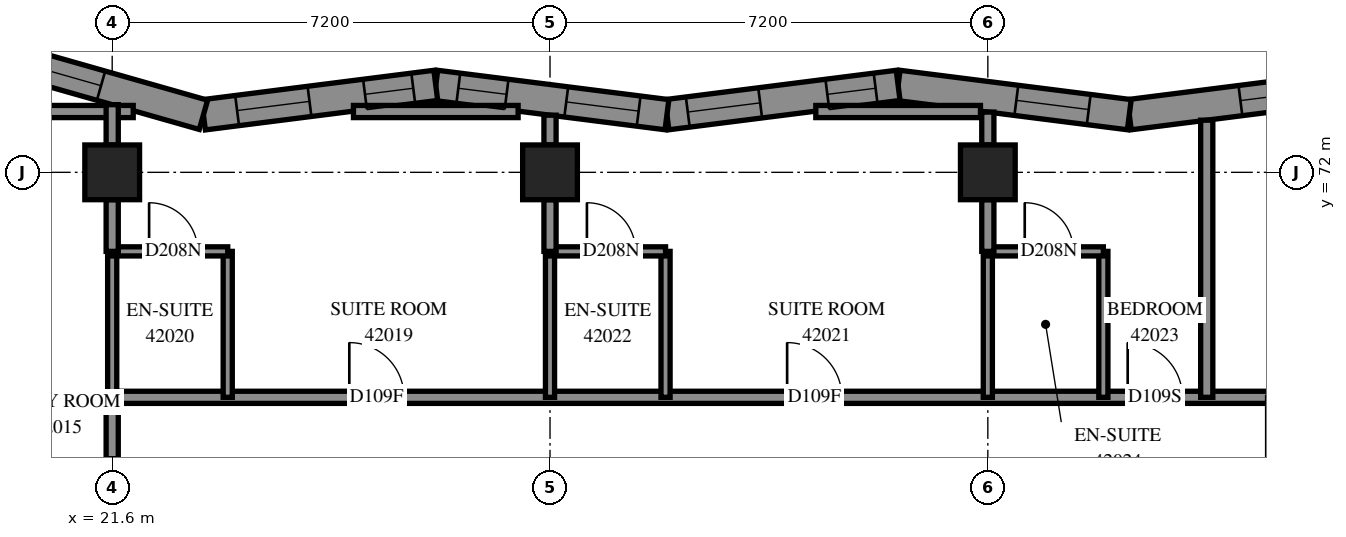
"""IFC4 building model, lengths in metres.
Left out: names, types, materials, properties, quantities, classifications, styles, units other than length and angle.
Written with IfcOpenShell. Run it as: python <this file> out.ifc"""

import sys

from ifc_helpers import new_model, si_unit, direction, frame, frame_2d, origin, origin_2d, place, context, subcontext, project, spatial, polyline, rectangle, outline, extrude, element, fill, save


model = new_model("IFC4")
c1 = context("Model", 3, precision=1e-05, world=origin(), true_north=direction((0.0, 1.0)))
c2 = subcontext(c1, "Body", "Model", "MODEL_VIEW")
j1 = project(units=[si_unit("LENGTHUNIT", "METRE"), si_unit("PLANEANGLEUNIT", "RADIAN")], contexts=[c1])
p1 = place(None, origin())
s1 = spatial("IfcSite", under=j1, at=p1, CompositionType="ELEMENT")
p2 = place(p1, origin())
s2 = spatial("IfcBuilding", under=s1, at=p2, CompositionType="ELEMENT")
p3 = place(p2, frame((0.0, 0.0, 155.8)))
s3 = spatial("IfcBuildingStorey", under=s2, at=p3, CompositionType="ELEMENT", Elevation=155.8)
for number, where, z_axis, x_axis in (
    (1, (21.6, 72.0, 0.0), (0.0, 0.0, 1.0), (1.0, 0.0, 0.0)),
    (2, (28.8, 72.0, 0.0), (0.0, 0.0, 1.0), (1.0, 0.0, 0.0)),
    (3, (36.0, 72.0, 0.0), (0.0, 0.0, 1.0), (1.0, 0.0, 0.0)),
):
    element("IfcColumn", number, at=place(p3, frame(where, z_axis=z_axis, x_axis=x_axis)), inside=s3, PredefinedType="COLUMN", context=c2, shape_type="SweptSolid", body=[
        extrude(rectangle(XDim=0.9, YDim=0.9, at=origin_2d()), origin(), (0.0, 0.0, 1.0), 3.1),
    ])
p4 = place(p3, frame((42.128, 73.43, 0.0), z_axis=(0.0, 0.0, 1.0), x_axis=(-0.9920583495, -0.1257785003, 0.0)))
e4 = element("IfcWall", 4, at=p4, inside=s3, PredefinedType="SOLIDWALL", context=c2, shape_type="SweptSolid", body=[
    extrude(outline(polyline([(-0.032, -0.25), (3.8, -0.25), (3.864, 0.25), (0.032, 0.25), (-0.032, -0.25)])), origin(), (0.0, 0.0, 1.0), 3.1),
])
p5 = place(p4, frame((0.79, 0.0, 0.45)))
e5 = element("IfcOpeningElement", 5, at=p5, cuts=e4, PredefinedType="OPENING", context=c2, shape_type="SweptSolid", body=[
    extrude(rectangle(XDim=1.2, YDim=2.5, at=frame_2d((0.6, 1.25))), frame((0.0, 0.26, 0.0), z_axis=(0.0, -1.0, 0.0), x_axis=(1.0, 0.0, 0.0)), (0.0, 0.0, 1.0), 0.52),
])
p6 = place(p3, frame((38.327, 72.948, 0.0), z_axis=(0.0, 0.0, 1.0), x_axis=(-0.9920583495, 0.1257785003, 0.0)))
e6 = element("IfcWall", 6, at=p6, inside=s3, PredefinedType="SOLIDWALL", context=c2, shape_type="SweptSolid", body=[
    extrude(outline(polyline([(0.032, -0.25), (3.864, -0.25), (3.8, 0.25), (-0.032, 0.25), (0.032, -0.25)])), origin(), (0.0, 0.0, 1.0), 3.1),
])
p7 = place(p6, frame((0.673, 0.0, 0.45)))
e7 = element("IfcOpeningElement", 7, at=p7, cuts=e6, PredefinedType="OPENING", context=c2, shape_type="SweptSolid", body=[
    extrude(rectangle(XDim=1.2, YDim=2.5, at=frame_2d((0.6, 1.25))), frame((0.0, 0.26, 0.0), z_axis=(0.0, -1.0, 0.0), x_axis=(1.0, 0.0, 0.0)), (0.0, 0.0, 1.0), 0.52),
])
p8 = place(p3, frame((34.525, 73.43, 0.0), z_axis=(0.0, 0.0, 1.0), x_axis=(-0.9920583495, -0.1257785003, 0.0)))
e8 = element("IfcWall", 8, at=p8, inside=s3, PredefinedType="SOLIDWALL", context=c2, shape_type="SweptSolid", body=[
    extrude(outline(polyline([(-0.032, -0.25), (3.8, -0.25), (3.864, 0.25), (0.032, 0.25), (-0.032, -0.25)])), origin(), (0.0, 0.0, 1.0), 3.1),
])
p9 = place(p8, frame((2.287, 0.0, 0.45)))
e9 = element("IfcOpeningElement", 9, at=p9, cuts=e8, PredefinedType="OPENING", context=c2, shape_type="SweptSolid", body=[
    extrude(rectangle(XDim=1.2, YDim=2.5, at=frame_2d((0.6, 1.25))), frame((0.0, 0.26, 0.0), z_axis=(0.0, -1.0, 0.0), x_axis=(1.0, 0.0, 0.0)), (0.0, 0.0, 1.0), 0.52),
])
p10 = place(p8, frame((0.373, 0.0, 0.45)))
e10 = element("IfcOpeningElement", 10, at=p10, cuts=e8, PredefinedType="OPENING", context=c2, shape_type="SweptSolid", body=[
    extrude(rectangle(XDim=0.8, YDim=2.5, at=frame_2d((0.4, 1.25))), frame((0.0, 0.26, 0.0), z_axis=(0.0, -1.0, 0.0), x_axis=(1.0, 0.0, 0.0)), (0.0, 0.0, 1.0), 0.52),
])
p11 = place(p3, frame((30.723, 72.948, 0.0), z_axis=(0.0, 0.0, 1.0), x_axis=(-0.9920583495, 0.1257785003, 0.0)))
e11 = element("IfcWall", 11, at=p11, inside=s3, PredefinedType="SOLIDWALL", context=c2, shape_type="SweptSolid", body=[
    extrude(outline(polyline([(0.032, -0.25), (3.864, -0.25), (3.8, 0.25), (-0.032, 0.25), (0.032, -0.25)])), origin(), (0.0, 0.0, 1.0), 3.1),
])
p12 = place(p11, frame((0.469, 0.0, 0.45)))
e12 = element("IfcOpeningElement", 12, at=p12, cuts=e11, PredefinedType="OPENING", context=c2, shape_type="SweptSolid", body=[
    extrude(rectangle(XDim=1.2, YDim=2.5, at=frame_2d((0.6, 1.25))), frame((0.0, 0.26, 0.0), z_axis=(0.0, -1.0, 0.0), x_axis=(1.0, 0.0, 0.0)), (0.0, 0.0, 1.0), 0.52),
])
p13 = place(p11, frame((2.659, 0.0, 0.45)))
e13 = element("IfcOpeningElement", 13, at=p13, cuts=e11, PredefinedType="OPENING", context=c2, shape_type="SweptSolid", body=[
    extrude(rectangle(XDim=0.8, YDim=2.5, at=frame_2d((0.4, 1.25))), frame((0.0, 0.26, 0.0), z_axis=(0.0, -1.0, 0.0), x_axis=(1.0, 0.0, 0.0)), (0.0, 0.0, 1.0), 0.52),
])
p14 = place(p3, frame((26.921, 73.43, 0.0), z_axis=(0.0, 0.0, 1.0), x_axis=(-0.9920598708, -0.1257665013, 0.0)))
e14 = element("IfcWall", 14, at=p14, inside=s3, PredefinedType="SOLIDWALL", context=c2, shape_type="SweptSolid", body=[
    extrude(outline(polyline([(-0.032, -0.25), (3.8, -0.25), (3.903, 0.25), (0.032, 0.25), (-0.032, -0.25)])), origin(), (0.0, 0.0, 1.0), 3.1),
])
p15 = place(p14, frame((2.093, 0.0, 0.45)))
e15 = element("IfcOpeningElement", 15, at=p15, cuts=e14, PredefinedType="OPENING", context=c2, shape_type="SweptSolid", body=[
    extrude(rectangle(XDim=1.2, YDim=2.5, at=frame_2d((0.6, 1.25))), frame((0.0, 0.26, 0.0), z_axis=(0.0, -1.0, 0.0), x_axis=(1.0, 0.0, 0.0)), (0.0, 0.0, 1.0), 0.52),
])
p16 = place(p14, frame((0.373, 0.0, 0.45)))
e16 = element("IfcOpeningElement", 16, at=p16, cuts=e14, PredefinedType="OPENING", context=c2, shape_type="SweptSolid", body=[
    extrude(rectangle(XDim=0.8, YDim=2.5, at=frame_2d((0.4, 1.25))), frame((0.0, 0.26, 0.0), z_axis=(0.0, -1.0, 0.0), x_axis=(1.0, 0.0, 0.0)), (0.0, 0.0, 1.0), 0.52),
])
p17 = place(p3, frame((23.1, 72.946, 0.0), z_axis=(0.0, 0.0, 1.0), x_axis=(-0.9618080431, 0.2737248403, 0.0)))
e17 = element("IfcWall", 17, at=p17, inside=s3, PredefinedType="SOLIDWALL", context=c2, shape_type="SweptSolid", body=[
    extrude(outline(polyline([(0.051, -0.25), (4.004, -0.25), (3.342, 0.25), (-0.051, 0.25), (0.051, -0.25)])), origin(), (0.0, 0.0, 1.0), 3.1),
])
p18 = place(p17, frame((1.751, 0.0, 0.45)))
e18 = element("IfcOpeningElement", 18, at=p18, cuts=e17, PredefinedType="OPENING", context=c2, shape_type="SweptSolid", body=[
    extrude(rectangle(XDim=1.2, YDim=2.5, at=frame_2d((0.6, 1.25))), frame((0.0, 0.26, 0.0), z_axis=(0.0, -1.0, 0.0), x_axis=(1.0, 0.0, 0.0)), (0.0, 0.0, 1.0), 0.52),
])
p19 = place(p3, frame((21.6, 68.3, 0.0), z_axis=(0.0, 0.0, 1.0), x_axis=(1.0, 0.0, 0.0)))
e19 = element("IfcWall", 19, at=p19, inside=s3, PredefinedType="PARTITIONING", context=c2, shape_type="SweptSolid", body=[
    extrude(rectangle(XDim=19.1, YDim=0.2, at=frame_2d((9.55, 0.0))), origin(), (0.0, 0.0, 1.0), 3.1),
])
p20 = place(p19, frame((3.899, 0.0, 0.0)))
e20 = element("IfcOpeningElement", 20, at=p20, cuts=e19, PredefinedType="OPENING", context=c2, shape_type="SweptSolid", body=[
    extrude(rectangle(XDim=0.9, YDim=2.1, at=frame_2d((0.45, 1.05))), frame((0.0, 0.11, 0.0), z_axis=(0.0, -1.0, 0.0), x_axis=(1.0, 0.0, 0.0)), (0.0, 0.0, 1.0), 0.22),
])
p21 = place(p19, frame((11.099, 0.0, 0.0)))
e21 = element("IfcOpeningElement", 21, at=p21, cuts=e19, PredefinedType="OPENING", context=c2, shape_type="SweptSolid", body=[
    extrude(rectangle(XDim=0.9, YDim=2.1, at=frame_2d((0.45, 1.05))), frame((0.0, 0.11, 0.0), z_axis=(0.0, -1.0, 0.0), x_axis=(1.0, 0.0, 0.0)), (0.0, 0.0, 1.0), 0.22),
])
p22 = place(p19, frame((16.7, 0.0, 0.0)))
e22 = element("IfcOpeningElement", 22, at=p22, cuts=e19, PredefinedType="OPENING", context=c2, shape_type="SweptSolid", body=[
    extrude(rectangle(XDim=0.9, YDim=2.1, at=frame_2d((0.45, 1.05))), frame((0.0, 0.11, 0.0), z_axis=(0.0, -1.0, 0.0), x_axis=(1.0, 0.0, 0.0)), (0.0, 0.0, 1.0), 0.22),
])
p23 = place(p3, frame((39.6, 68.3, 0.0), z_axis=(0.0, 0.0, 1.0), x_axis=(0.0, 1.0, 0.0)))
e23 = element("IfcWall", 23, at=p23, inside=s3, PredefinedType="PARTITIONING", context=c2, shape_type="SweptSolid", body=[
    extrude(rectangle(XDim=4.558, YDim=0.2, at=frame_2d((2.279, 0.0))), origin(), (0.0, 0.0, 1.0), 3.1),
])
for number, where, z_axis, x_axis in (
    (24, (33.171, 73.0, 0.0), (0.0, 0.0, 1.0), (1.0, 0.0, 0.0)),
    (25, (25.567, 73.0, 0.0), (0.0, 0.0, 1.0), (1.0, 0.0, 0.0)),
):
    element("IfcWall", number, at=place(p3, frame(where, z_axis=z_axis, x_axis=x_axis)), inside=s3, PredefinedType="PARTITIONING", context=c2, shape_type="SweptSolid", body=[
        extrude(rectangle(XDim=2.708, YDim=0.2, at=frame_2d((1.354, 0.0))), origin(), (0.0, 0.0, 1.0), 3.1),
    ])
p24 = place(p3, frame((21.6, 68.3, 0.0), z_axis=(0.0, 0.0, 1.0), x_axis=(0.0, 1.0, 0.0)))
e26 = element("IfcWall", 26, at=p24, inside=s3, PredefinedType="PARTITIONING", context=c2, shape_type="SweptSolid", body=[
    extrude(rectangle(XDim=2.4, YDim=0.15, at=frame_2d((1.2, 0.0))), origin(), (0.0, 0.0, 1.0), 2.6),
])
for number, where, z_axis, x_axis in (
    (27, (23.5, 68.3, 0.0), (0.0, 0.0, 1.0), (0.0, 1.0, 0.0)),
    (28, (28.8, 68.3, 0.0), (0.0, 0.0, 1.0), (0.0, 1.0, 0.0)),
    (29, (30.7, 68.3, 0.0), (0.0, 0.0, 1.0), (0.0, 1.0, 0.0)),
    (30, (37.9, 68.3, 0.0), (0.0, 0.0, 1.0), (0.0, 1.0, 0.0)),
    (31, (36.0, 68.3, 0.0), (0.0, 0.0, 1.0), (0.0, 1.0, 0.0)),
):
    element("IfcWall", number, at=place(p3, frame(where, z_axis=z_axis, x_axis=x_axis)), inside=s3, PredefinedType="PARTITIONING", context=c2, shape_type="SweptSolid", body=[
        extrude(rectangle(XDim=2.4, YDim=0.15, at=frame_2d((1.2, 0.0))), origin(), (0.0, 0.0, 1.0), 3.1),
    ])
p25 = place(p3, frame((21.6, 66.1, 0.0), z_axis=(0.0, 0.0, 1.0), x_axis=(0.0, 1.0, 0.0)))
e32 = element("IfcWall", 32, at=p25, inside=s3, PredefinedType="PARTITIONING", context=c2, shape_type="SweptSolid", body=[
    extrude(rectangle(XDim=2.2, YDim=0.2, at=frame_2d((1.1, 0.0))), origin(), (0.0, 0.0, 1.0), 2.6),
])
p26 = place(p25, frame((0.213, 0.0, 0.0)))
e33 = element("IfcOpeningElement", 33, at=p26, cuts=e32, PredefinedType="OPENING", context=c2, shape_type="SweptSolid", body=[
    extrude(rectangle(XDim=1.0, YDim=2.1, at=frame_2d((0.5, 1.05))), frame((0.0, 0.11, 0.0), z_axis=(0.0, -1.0, 0.0), x_axis=(1.0, 0.0, 0.0)), (0.0, 0.0, 1.0), 0.22),
])
p27 = place(p3, frame((19.818, 73.0, 0.0), z_axis=(0.0, 0.0, 1.0), x_axis=(1.0, 0.0, 0.0)))
e34 = element("IfcWall", 34, at=p27, inside=s3, PredefinedType="PARTITIONING", context=c2, shape_type="SweptSolid", body=[
    extrude(rectangle(XDim=2.128, YDim=0.2, at=frame_2d((1.064, 0.0))), origin(), (0.0, 0.0, 1.0), 3.1),
])
p28 = place(p3, frame((21.6, 70.7, 0.0), z_axis=(0.0, 0.0, 1.0), x_axis=(1.0, 0.0, 0.0)))
e35 = element("IfcWall", 35, at=p28, inside=s3, PredefinedType="PARTITIONING", context=c2, shape_type="SweptSolid", body=[
    extrude(rectangle(XDim=1.9, YDim=0.15, at=frame_2d((0.95, 0.0))), origin(), (0.0, 0.0, 1.0), 3.1),
])
p29 = place(p28, frame((0.607, 0.0, 0.0)))
e36 = element("IfcOpeningElement", 36, at=p29, cuts=e35, PredefinedType="OPENING", context=c2, shape_type="SweptSolid", body=[
    extrude(rectangle(XDim=0.8, YDim=2.1, at=frame_2d((0.4, 1.05))), frame((0.0, 0.085, 0.0), z_axis=(0.0, -1.0, 0.0), x_axis=(1.0, 0.0, 0.0)), (0.0, 0.0, 1.0), 0.17),
])
p30 = place(p3, frame((28.8, 70.7, 0.0), z_axis=(0.0, 0.0, 1.0), x_axis=(1.0, 0.0, 0.0)))
e37 = element("IfcWall", 37, at=p30, inside=s3, PredefinedType="PARTITIONING", context=c2, shape_type="SweptSolid", body=[
    extrude(rectangle(XDim=1.9, YDim=0.15, at=frame_2d((0.95, 0.0))), origin(), (0.0, 0.0, 1.0), 3.1),
])
p31 = place(p30, frame((0.607, 0.0, 0.0)))
e38 = element("IfcOpeningElement", 38, at=p31, cuts=e37, PredefinedType="OPENING", context=c2, shape_type="SweptSolid", body=[
    extrude(rectangle(XDim=0.8, YDim=2.1, at=frame_2d((0.4, 1.05))), frame((0.0, 0.085, 0.0), z_axis=(0.0, -1.0, 0.0), x_axis=(1.0, 0.0, 0.0)), (0.0, 0.0, 1.0), 0.17),
])
p32 = place(p3, frame((36.0, 70.7, 0.0), z_axis=(0.0, 0.0, 1.0), x_axis=(1.0, 0.0, 0.0)))
e39 = element("IfcWall", 39, at=p32, inside=s3, PredefinedType="PARTITIONING", context=c2, shape_type="SweptSolid", body=[
    extrude(rectangle(XDim=1.9, YDim=0.15, at=frame_2d((0.95, 0.0))), origin(), (0.0, 0.0, 1.0), 3.1),
])
p33 = place(p32, frame((0.607, 0.0, 0.0)))
e40 = element("IfcOpeningElement", 40, at=p33, cuts=e39, PredefinedType="OPENING", context=c2, shape_type="SweptSolid", body=[
    extrude(rectangle(XDim=0.8, YDim=2.1, at=frame_2d((0.4, 1.05))), frame((0.0, 0.085, 0.0), z_axis=(0.0, -1.0, 0.0), x_axis=(1.0, 0.0, 0.0)), (0.0, 0.0, 1.0), 0.17),
])
p34 = place(p3, frame((21.6, 70.7, 0.0), z_axis=(0.0, 0.0, 1.0), x_axis=(0.0, 1.0, 0.0)))
e41 = element("IfcWall", 41, at=p34, inside=s3, PredefinedType="PARTITIONING", context=c2, shape_type="SweptSolid", body=[
    extrude(rectangle(XDim=0.85, YDim=0.2, at=frame_2d((0.425, 0.0))), origin(), (0.0, 0.0, 1.0), 2.6),
])
for number, where, z_axis, x_axis in (
    (42, (28.8, 70.7, 0.0), (0.0, 0.0, 1.0), (0.0, 1.0, 0.0)),
    (43, (36.0, 70.7, 0.0), (0.0, 0.0, 1.0), (0.0, 1.0, 0.0)),
):
    element("IfcWall", number, at=place(p3, frame(where, z_axis=z_axis, x_axis=x_axis)), inside=s3, PredefinedType="PARTITIONING", context=c2, shape_type="SweptSolid", body=[
        extrude(rectangle(XDim=0.85, YDim=0.2, at=frame_2d((0.425, 0.0))), origin(), (0.0, 0.0, 1.0), 3.1),
    ])
p35 = place(p3, frame((21.6, 72.45, 0.0), z_axis=(0.0, 0.0, 1.0), x_axis=(0.0, 1.0, 0.0)))
e44 = element("IfcWall", 44, at=p35, inside=s3, PredefinedType="PARTITIONING", context=c2, shape_type="SweptSolid", body=[
    extrude(rectangle(XDim=0.663, YDim=0.2, at=frame_2d((0.331, 0.0))), origin(), (0.0, 0.0, 1.0), 3.1),
])
p36 = place(p3, frame((36.0, 72.45, 0.0), z_axis=(0.0, 0.0, 1.0), x_axis=(0.0, 1.0, 0.0)))
e45 = element("IfcWall", 45, at=p36, inside=s3, PredefinedType="PARTITIONING", context=c2, shape_type="SweptSolid", body=[
    extrude(rectangle(XDim=0.541, YDim=0.2, at=frame_2d((0.271, 0.0))), origin(), (0.0, 0.0, 1.0), 3.1),
])
p37 = place(p3, frame((28.8, 72.45, 0.0), z_axis=(0.0, 0.0, 1.0), x_axis=(0.0, 1.0, 0.0)))
e46 = element("IfcWall", 46, at=p37, inside=s3, PredefinedType="PARTITIONING", context=c2, shape_type="SweptSolid", body=[
    extrude(rectangle(XDim=0.49, YDim=0.2, at=frame_2d((0.245, 0.0))), origin(), (0.0, 0.0, 1.0), 3.1),
])
p38 = place(p5, origin())
e47 = element("IfcWindow", 47, at=p38, inside=s3, PartitioningType="SINGLE_PANEL", PredefinedType="WINDOW", context=c2, shape_type="SweptSolid", body=[
    extrude(rectangle(XDim=1.2, YDim=2.5, at=frame_2d((0.6, 1.25))), frame((0.0, 0.12, 0.0), z_axis=(0.0, -1.0, 0.0), x_axis=(1.0, 0.0, 0.0)), (0.0, 0.0, 1.0), 0.06),
])
fill(e5, e47)
p39 = place(p7, origin())
e48 = element("IfcWindow", 48, at=p39, inside=s3, PartitioningType="SINGLE_PANEL", PredefinedType="WINDOW", context=c2, shape_type="SweptSolid", body=[
    extrude(rectangle(XDim=1.2, YDim=2.5, at=frame_2d((0.6, 1.25))), frame((0.0, 0.18, 0.0), z_axis=(0.0, -1.0, 0.0), x_axis=(1.0, 0.0, 0.0)), (0.0, 0.0, 1.0), 0.06),
])
fill(e7, e48)
p40 = place(p9, origin())
e49 = element("IfcWindow", 49, at=p40, inside=s3, PartitioningType="SINGLE_PANEL", PredefinedType="WINDOW", context=c2, shape_type="SweptSolid", body=[
    extrude(rectangle(XDim=1.2, YDim=2.5, at=frame_2d((0.6, 1.25))), frame((0.0, 0.18, 0.0), z_axis=(0.0, -1.0, 0.0), x_axis=(1.0, 0.0, 0.0)), (0.0, 0.0, 1.0), 0.06),
])
fill(e9, e49)
p41 = place(p12, origin())
e50 = element("IfcWindow", 50, at=p41, inside=s3, PartitioningType="SINGLE_PANEL", PredefinedType="WINDOW", context=c2, shape_type="SweptSolid", body=[
    extrude(rectangle(XDim=1.2, YDim=2.5, at=frame_2d((0.6, 1.25))), frame((0.0, 0.18, 0.0), z_axis=(0.0, -1.0, 0.0), x_axis=(1.0, 0.0, 0.0)), (0.0, 0.0, 1.0), 0.06),
])
fill(e12, e50)
p42 = place(p15, origin())
e51 = element("IfcWindow", 51, at=p42, inside=s3, PartitioningType="SINGLE_PANEL", PredefinedType="WINDOW", context=c2, shape_type="SweptSolid", body=[
    extrude(rectangle(XDim=1.2, YDim=2.5, at=frame_2d((0.6, 1.25))), frame((0.0, 0.18, 0.0), z_axis=(0.0, -1.0, 0.0), x_axis=(1.0, 0.0, 0.0)), (0.0, 0.0, 1.0), 0.06),
])
fill(e15, e51)
p43 = place(p18, origin())
e52 = element("IfcWindow", 52, at=p43, inside=s3, PartitioningType="SINGLE_PANEL", PredefinedType="WINDOW", context=c2, shape_type="SweptSolid", body=[
    extrude(rectangle(XDim=1.2, YDim=2.5, at=frame_2d((0.6, 1.25))), frame((0.0, 0.18, 0.0), z_axis=(0.0, -1.0, 0.0), x_axis=(1.0, 0.0, 0.0)), (0.0, 0.0, 1.0), 0.06),
])
fill(e18, e52)
p44 = place(p20, origin())
e53 = element("IfcDoor", 53, at=p44, inside=s3, OperationType="SINGLE_SWING_RIGHT", PredefinedType="DOOR", context=c2, shape_type="SweptSolid", body=[
    extrude(rectangle(XDim=0.9, YDim=2.1, at=frame_2d((0.45, 1.05))), frame((0.0, 0.025, 0.0), z_axis=(0.0, -1.0, 0.0), x_axis=(1.0, 0.0, 0.0)), (0.0, 0.0, 1.0), 0.05),
])
fill(e20, e53)
p45 = place(p29, origin())
e54 = element("IfcDoor", 54, at=p45, inside=s3, OperationType="SINGLE_SWING_RIGHT", PredefinedType="DOOR", context=c2, shape_type="SweptSolid", body=[
    extrude(rectangle(XDim=0.8, YDim=2.1, at=frame_2d((0.4, 1.05))), frame((0.0, 0.025, 0.0), z_axis=(0.0, -1.0, 0.0), x_axis=(1.0, 0.0, 0.0)), (0.0, 0.0, 1.0), 0.05),
])
fill(e36, e54)
p46 = place(p21, origin())
e55 = element("IfcDoor", 55, at=p46, inside=s3, OperationType="SINGLE_SWING_RIGHT", PredefinedType="DOOR", context=c2, shape_type="SweptSolid", body=[
    extrude(rectangle(XDim=0.9, YDim=2.1, at=frame_2d((0.45, 1.05))), frame((0.0, 0.025, 0.0), z_axis=(0.0, -1.0, 0.0), x_axis=(1.0, 0.0, 0.0)), (0.0, 0.0, 1.0), 0.05),
])
fill(e21, e55)
p47 = place(p31, origin())
e56 = element("IfcDoor", 56, at=p47, inside=s3, OperationType="SINGLE_SWING_RIGHT", PredefinedType="DOOR", context=c2, shape_type="SweptSolid", body=[
    extrude(rectangle(XDim=0.8, YDim=2.1, at=frame_2d((0.4, 1.05))), frame((0.0, 0.025, 0.0), z_axis=(0.0, -1.0, 0.0), x_axis=(1.0, 0.0, 0.0)), (0.0, 0.0, 1.0), 0.05),
])
fill(e38, e56)
p48 = place(p22, origin())
e57 = element("IfcDoor", 57, at=p48, inside=s3, OperationType="SINGLE_SWING_RIGHT", PredefinedType="DOOR", context=c2, shape_type="SweptSolid", body=[
    extrude(rectangle(XDim=0.9, YDim=2.1, at=frame_2d((0.45, 1.05))), frame((0.0, 0.025, 0.0), z_axis=(0.0, -1.0, 0.0), x_axis=(1.0, 0.0, 0.0)), (0.0, 0.0, 1.0), 0.05),
])
fill(e22, e57)
p49 = place(p33, origin())
e58 = element("IfcDoor", 58, at=p49, inside=s3, OperationType="SINGLE_SWING_RIGHT", PredefinedType="DOOR", context=c2, shape_type="SweptSolid", body=[
    extrude(rectangle(XDim=0.8, YDim=2.1, at=frame_2d((0.4, 1.05))), frame((0.0, 0.025, 0.0), z_axis=(0.0, -1.0, 0.0), x_axis=(1.0, 0.0, 0.0)), (0.0, 0.0, 1.0), 0.05),
])
fill(e40, e58)
p50 = place(p10, origin())
e59 = element("IfcWindow", 59, at=p50, inside=s3, PartitioningType="SINGLE_PANEL", PredefinedType="WINDOW", context=c2, shape_type="SweptSolid", body=[
    extrude(rectangle(XDim=0.8, YDim=2.5, at=frame_2d((0.4, 1.25))), frame((0.0, 0.12, 0.0), z_axis=(0.0, -1.0, 0.0), x_axis=(1.0, 0.0, 0.0)), (0.0, 0.0, 1.0), 0.06),
])
fill(e10, e59)
p51 = place(p13, origin())
e60 = element("IfcWindow", 60, at=p51, inside=s3, PartitioningType="SINGLE_PANEL", PredefinedType="WINDOW", context=c2, shape_type="SweptSolid", body=[
    extrude(rectangle(XDim=0.8, YDim=2.5, at=frame_2d((0.4, 1.25))), frame((0.0, 0.12, 0.0), z_axis=(0.0, -1.0, 0.0), x_axis=(1.0, 0.0, 0.0)), (0.0, 0.0, 1.0), 0.06),
])
fill(e13, e60)
p52 = place(p16, origin())
e61 = element("IfcWindow", 61, at=p52, inside=s3, PartitioningType="SINGLE_PANEL", PredefinedType="WINDOW", context=c2, shape_type="SweptSolid", body=[
    extrude(rectangle(XDim=0.8, YDim=2.5, at=frame_2d((0.4, 1.25))), frame((0.0, 0.12, 0.0), z_axis=(0.0, -1.0, 0.0), x_axis=(1.0, 0.0, 0.0)), (0.0, 0.0, 1.0), 0.06),
])
fill(e16, e61)
save(model, sys.argv[1])
